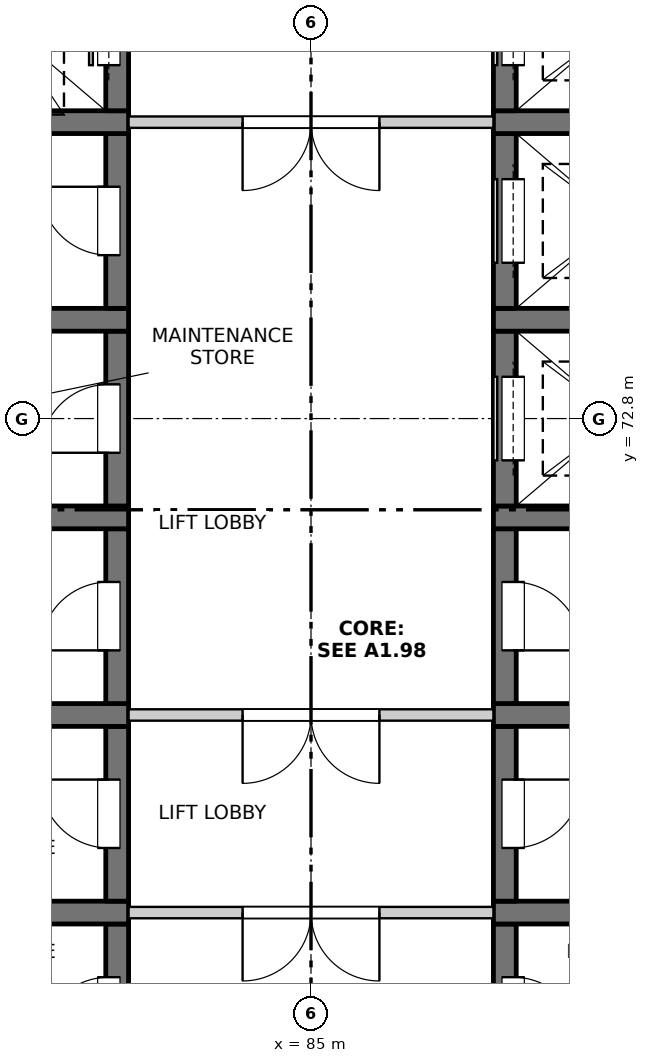
"""IFC4 building model, lengths in metres.
Left out: names, types, materials, properties, quantities, classifications, styles, units other than length and angle.
Written with IfcOpenShell. Run it as: python <this file> out.ifc"""

import sys

from ifc_helpers import new_model, si_unit, direction, frame, frame_2d, origin, place, context, subcontext, project, spatial, rectangle, extrude, element, fill, save


model = new_model("IFC4")
c1 = context("Model", 3, precision=1e-05, world=origin(), true_north=direction((0.0, 1.0)))
c2 = subcontext(c1, "Body", "Model", "MODEL_VIEW")
j1 = project(units=[si_unit("LENGTHUNIT", "METRE"), si_unit("PLANEANGLEUNIT", "RADIAN")], contexts=[c1])
p1 = place(None, origin())
s1 = spatial("IfcSite", under=j1, at=p1, CompositionType="ELEMENT")
p2 = place(p1, origin())
s2 = spatial("IfcBuilding", under=s1, at=p2, CompositionType="ELEMENT")
p3 = place(p2, frame((0.0, 0.0, 186.0)))
s3 = spatial("IfcBuildingStorey", under=s2, at=p3, CompositionType="ELEMENT", Elevation=186.0)
p4 = place(p3, frame((82.45, 63.85, -0.25), z_axis=(0.0, 0.0, 1.0), x_axis=(0.0, 1.0, 0.0)))
e1 = element("IfcWall", 1, at=p4, inside=s3, PredefinedType="SOLIDWALL", context=c2, shape_type="SweptSolid", body=[
    extrude(rectangle(XDim=2.3, YDim=0.3, at=frame_2d((1.15, 0.0))), origin(), (0.0, 0.0, 1.0), 3.4),
])
p5 = place(p4, frame((0.7, 0.0, 0.25)))
e2 = element("IfcOpeningElement", 2, at=p5, cuts=e1, PredefinedType="OPENING", context=c2, shape_type="SweptSolid", body=[
    extrude(rectangle(XDim=0.9, YDim=2.1, at=frame_2d((0.45, 1.05))), frame((0.0, 0.16, 0.0), z_axis=(0.0, -1.0, 0.0), x_axis=(1.0, 0.0, 0.0)), (0.0, 0.0, 1.0), 0.32),
])
p6 = place(p3, frame((79.6, 66.3, -0.25), z_axis=(0.0, 0.0, 1.0), x_axis=(1.0, 0.0, 0.0)))
e3 = element("IfcWall", 3, at=p6, inside=s3, PredefinedType="SOLIDWALL", context=c2, shape_type="SweptSolid", body=[
    extrude(rectangle(XDim=3.0, YDim=0.3, at=frame_2d((1.5, 0.0))), origin(), (0.0, 0.0, 1.0), 3.4),
])
p7 = place(p3, frame((82.45, 66.45, -0.25), z_axis=(0.0, 0.0, 1.0), x_axis=(0.0, 1.0, 0.0)))
e4 = element("IfcWall", 4, at=p7, inside=s3, PredefinedType="SOLIDWALL", context=c2, shape_type="SweptSolid", body=[
    extrude(rectangle(XDim=2.3, YDim=0.3, at=frame_2d((1.15, 0.0))), origin(), (0.0, 0.0, 1.0), 3.4),
])
p8 = place(p7, frame((0.7, 0.0, 0.25)))
e5 = element("IfcOpeningElement", 5, at=p8, cuts=e4, PredefinedType="OPENING", context=c2, shape_type="SweptSolid", body=[
    extrude(rectangle(XDim=0.9, YDim=2.1, at=frame_2d((0.45, 1.05))), frame((0.0, 0.16, 0.0), z_axis=(0.0, -1.0, 0.0), x_axis=(1.0, 0.0, 0.0)), (0.0, 0.0, 1.0), 0.32),
])
p9 = place(p3, frame((79.6, 68.9, -0.25), z_axis=(0.0, 0.0, 1.0), x_axis=(1.0, 0.0, 0.0)))
e6 = element("IfcWall", 6, at=p9, inside=s3, PredefinedType="SOLIDWALL", context=c2, shape_type="SweptSolid", body=[
    extrude(rectangle(XDim=3.0, YDim=0.3, at=frame_2d((1.5, 0.0))), origin(), (0.0, 0.0, 1.0), 3.4),
])
p10 = place(p3, frame((82.45, 69.05, -0.25), z_axis=(0.0, 0.0, 1.0), x_axis=(0.0, 1.0, 0.0)))
e7 = element("IfcWall", 7, at=p10, inside=s3, PredefinedType="SOLIDWALL", context=c2, shape_type="SweptSolid", body=[
    extrude(rectangle(XDim=2.3, YDim=0.3, at=frame_2d((1.15, 0.0))), origin(), (0.0, 0.0, 1.0), 3.4),
])
p11 = place(p10, frame((0.7, 0.0, 0.25)))
e8 = element("IfcOpeningElement", 8, at=p11, cuts=e7, PredefinedType="OPENING", context=c2, shape_type="SweptSolid", body=[
    extrude(rectangle(XDim=0.9, YDim=2.1, at=frame_2d((0.45, 1.05))), frame((0.0, 0.16, 0.0), z_axis=(0.0, -1.0, 0.0), x_axis=(1.0, 0.0, 0.0)), (0.0, 0.0, 1.0), 0.32),
])
p12 = place(p3, frame((79.6, 71.5, -0.25), z_axis=(0.0, 0.0, 1.0), x_axis=(1.0, 0.0, 0.0)))
e9 = element("IfcWall", 9, at=p12, inside=s3, PredefinedType="SOLIDWALL", context=c2, shape_type="SweptSolid", body=[
    extrude(rectangle(XDim=3.0, YDim=0.3, at=frame_2d((1.5, 0.0))), origin(), (0.0, 0.0, 1.0), 3.4),
])
p13 = place(p3, frame((82.45, 71.65, -0.25), z_axis=(0.0, 0.0, 1.0), x_axis=(0.0, 1.0, 0.0)))
e10 = element("IfcWall", 10, at=p13, inside=s3, PredefinedType="SOLIDWALL", context=c2, shape_type="SweptSolid", body=[
    extrude(rectangle(XDim=2.3, YDim=0.3, at=frame_2d((1.15, 0.0))), origin(), (0.0, 0.0, 1.0), 3.4),
])
p14 = place(p13, frame((0.7, 0.0, 0.25)))
e11 = element("IfcOpeningElement", 11, at=p14, cuts=e10, PredefinedType="OPENING", context=c2, shape_type="SweptSolid", body=[
    extrude(rectangle(XDim=0.9, YDim=2.1, at=frame_2d((0.45, 1.05))), frame((0.0, 0.16, 0.0), z_axis=(0.0, -1.0, 0.0), x_axis=(1.0, 0.0, 0.0)), (0.0, 0.0, 1.0), 0.32),
])
p15 = place(p3, frame((79.6, 74.1, -0.25), z_axis=(0.0, 0.0, 1.0), x_axis=(1.0, 0.0, 0.0)))
e12 = element("IfcWall", 12, at=p15, inside=s3, PredefinedType="SOLIDWALL", context=c2, shape_type="SweptSolid", body=[
    extrude(rectangle(XDim=3.0, YDim=0.3, at=frame_2d((1.5, 0.0))), origin(), (0.0, 0.0, 1.0), 3.4),
])
p16 = place(p3, frame((82.45, 74.25, -0.25), z_axis=(0.0, 0.0, 1.0), x_axis=(0.0, 1.0, 0.0)))
e13 = element("IfcWall", 13, at=p16, inside=s3, PredefinedType="SOLIDWALL", context=c2, shape_type="SweptSolid", body=[
    extrude(rectangle(XDim=2.3, YDim=0.3, at=frame_2d((1.15, 0.0))), origin(), (0.0, 0.0, 1.0), 3.4),
])
p17 = place(p16, frame((0.7, 0.0, 0.25)))
e14 = element("IfcOpeningElement", 14, at=p17, cuts=e13, PredefinedType="OPENING", context=c2, shape_type="SweptSolid", body=[
    extrude(rectangle(XDim=0.9, YDim=2.1, at=frame_2d((0.45, 1.05))), frame((0.0, 0.16, 0.0), z_axis=(0.0, -1.0, 0.0), x_axis=(1.0, 0.0, 0.0)), (0.0, 0.0, 1.0), 0.32),
])
p18 = place(p3, frame((79.6, 76.7, -0.25), z_axis=(0.0, 0.0, 1.0), x_axis=(1.0, 0.0, 0.0)))
e15 = element("IfcWall", 15, at=p18, inside=s3, PredefinedType="SOLIDWALL", context=c2, shape_type="SweptSolid", body=[
    extrude(rectangle(XDim=3.0, YDim=0.3, at=frame_2d((1.5, 0.0))), origin(), (0.0, 0.0, 1.0), 3.4),
])
p19 = place(p3, frame((82.45, 76.85, -0.25), z_axis=(0.0, 0.0, 1.0), x_axis=(0.0, 1.0, 0.0)))
e16 = element("IfcWall", 16, at=p19, inside=s3, PredefinedType="SOLIDWALL", context=c2, shape_type="SweptSolid", body=[
    extrude(rectangle(XDim=2.3, YDim=0.3, at=frame_2d((1.15, 0.0))), origin(), (0.0, 0.0, 1.0), 3.4),
])
p20 = place(p19, frame((0.6, 0.0, 0.25)))
e17 = element("IfcOpeningElement", 17, at=p20, cuts=e16, PredefinedType="OPENING", context=c2, shape_type="SweptSolid", body=[
    extrude(rectangle(XDim=1.1, YDim=2.1, at=frame_2d((0.55, 1.05))), frame((0.0, 0.16, 0.0), z_axis=(0.0, -1.0, 0.0), x_axis=(1.0, 0.0, 0.0)), (0.0, 0.0, 1.0), 0.32),
])
p21 = place(p3, frame((87.55, 63.85, -0.25), z_axis=(0.0, 0.0, 1.0), x_axis=(0.0, 1.0, 0.0)))
e18 = element("IfcWall", 18, at=p21, inside=s3, PredefinedType="SOLIDWALL", context=c2, shape_type="SweptSolid", body=[
    extrude(rectangle(XDim=2.3, YDim=0.3, at=frame_2d((1.15, 0.0))), origin(), (0.0, 0.0, 1.0), 3.4),
])
p22 = place(p21, frame((0.7, 0.0, 0.25)))
e19 = element("IfcOpeningElement", 19, at=p22, cuts=e18, PredefinedType="OPENING", context=c2, shape_type="SweptSolid", body=[
    extrude(rectangle(XDim=0.9, YDim=2.1, at=frame_2d((0.45, 1.05))), frame((0.0, 0.16, 0.0), z_axis=(0.0, -1.0, 0.0), x_axis=(1.0, 0.0, 0.0)), (0.0, 0.0, 1.0), 0.32),
])
p23 = place(p3, frame((87.4, 66.3, -0.25), z_axis=(0.0, 0.0, 1.0), x_axis=(1.0, 0.0, 0.0)))
e20 = element("IfcWall", 20, at=p23, inside=s3, PredefinedType="SOLIDWALL", context=c2, shape_type="SweptSolid", body=[
    extrude(rectangle(XDim=3.0, YDim=0.3, at=frame_2d((1.5, 0.0))), origin(), (0.0, 0.0, 1.0), 3.4),
])
p24 = place(p3, frame((87.55, 66.45, -0.25), z_axis=(0.0, 0.0, 1.0), x_axis=(0.0, 1.0, 0.0)))
e21 = element("IfcWall", 21, at=p24, inside=s3, PredefinedType="SOLIDWALL", context=c2, shape_type="SweptSolid", body=[
    extrude(rectangle(XDim=2.3, YDim=0.3, at=frame_2d((1.15, 0.0))), origin(), (0.0, 0.0, 1.0), 3.4),
])
p25 = place(p24, frame((0.7, 0.0, 0.25)))
e22 = element("IfcOpeningElement", 22, at=p25, cuts=e21, PredefinedType="OPENING", context=c2, shape_type="SweptSolid", body=[
    extrude(rectangle(XDim=0.9, YDim=2.1, at=frame_2d((0.45, 1.05))), frame((0.0, 0.16, 0.0), z_axis=(0.0, -1.0, 0.0), x_axis=(1.0, 0.0, 0.0)), (0.0, 0.0, 1.0), 0.32),
])
p26 = place(p3, frame((87.4, 68.9, -0.25), z_axis=(0.0, 0.0, 1.0), x_axis=(1.0, 0.0, 0.0)))
e23 = element("IfcWall", 23, at=p26, inside=s3, PredefinedType="SOLIDWALL", context=c2, shape_type="SweptSolid", body=[
    extrude(rectangle(XDim=3.0, YDim=0.3, at=frame_2d((1.5, 0.0))), origin(), (0.0, 0.0, 1.0), 3.4),
])
p27 = place(p3, frame((87.55, 69.05, -0.25), z_axis=(0.0, 0.0, 1.0), x_axis=(0.0, 1.0, 0.0)))
e24 = element("IfcWall", 24, at=p27, inside=s3, PredefinedType="SOLIDWALL", context=c2, shape_type="SweptSolid", body=[
    extrude(rectangle(XDim=2.3, YDim=0.3, at=frame_2d((1.15, 0.0))), origin(), (0.0, 0.0, 1.0), 3.4),
])
p28 = place(p27, frame((0.7, 0.0, 0.25)))
e25 = element("IfcOpeningElement", 25, at=p28, cuts=e24, PredefinedType="OPENING", context=c2, shape_type="SweptSolid", body=[
    extrude(rectangle(XDim=0.9, YDim=2.1, at=frame_2d((0.45, 1.05))), frame((0.0, 0.16, 0.0), z_axis=(0.0, -1.0, 0.0), x_axis=(1.0, 0.0, 0.0)), (0.0, 0.0, 1.0), 0.32),
])
p29 = place(p3, frame((87.4, 71.5, -0.25), z_axis=(0.0, 0.0, 1.0), x_axis=(1.0, 0.0, 0.0)))
e26 = element("IfcWall", 26, at=p29, inside=s3, PredefinedType="SOLIDWALL", context=c2, shape_type="SweptSolid", body=[
    extrude(rectangle(XDim=3.0, YDim=0.3, at=frame_2d((1.5, 0.0))), origin(), (0.0, 0.0, 1.0), 3.4),
])
p30 = place(p3, frame((87.55, 71.65, -0.25), z_axis=(0.0, 0.0, 1.0), x_axis=(0.0, 1.0, 0.0)))
e27 = element("IfcWall", 27, at=p30, inside=s3, PredefinedType="SOLIDWALL", context=c2, shape_type="SweptSolid", body=[
    extrude(rectangle(XDim=2.3, YDim=0.3, at=frame_2d((1.15, 0.0))), origin(), (0.0, 0.0, 1.0), 3.4),
])
p31 = place(p30, frame((0.6, 0.0, 0.25)))
e28 = element("IfcOpeningElement", 28, at=p31, cuts=e27, PredefinedType="OPENING", context=c2, shape_type="SweptSolid", body=[
    extrude(rectangle(XDim=1.1, YDim=2.1, at=frame_2d((0.55, 1.05))), frame((0.0, 0.16, 0.0), z_axis=(0.0, -1.0, 0.0), x_axis=(1.0, 0.0, 0.0)), (0.0, 0.0, 1.0), 0.32),
])
p32 = place(p3, frame((87.4, 74.1, -0.25), z_axis=(0.0, 0.0, 1.0), x_axis=(1.0, 0.0, 0.0)))
e29 = element("IfcWall", 29, at=p32, inside=s3, PredefinedType="SOLIDWALL", context=c2, shape_type="SweptSolid", body=[
    extrude(rectangle(XDim=3.0, YDim=0.3, at=frame_2d((1.5, 0.0))), origin(), (0.0, 0.0, 1.0), 3.4),
])
p33 = place(p3, frame((87.55, 74.25, -0.25), z_axis=(0.0, 0.0, 1.0), x_axis=(0.0, 1.0, 0.0)))
e30 = element("IfcWall", 30, at=p33, inside=s3, PredefinedType="SOLIDWALL", context=c2, shape_type="SweptSolid", body=[
    extrude(rectangle(XDim=2.3, YDim=0.3, at=frame_2d((1.15, 0.0))), origin(), (0.0, 0.0, 1.0), 3.4),
])
p34 = place(p33, frame((0.6, 0.0, 0.25)))
e31 = element("IfcOpeningElement", 31, at=p34, cuts=e30, PredefinedType="OPENING", context=c2, shape_type="SweptSolid", body=[
    extrude(rectangle(XDim=1.1, YDim=2.1, at=frame_2d((0.55, 1.05))), frame((0.0, 0.16, 0.0), z_axis=(0.0, -1.0, 0.0), x_axis=(1.0, 0.0, 0.0)), (0.0, 0.0, 1.0), 0.32),
])
p35 = place(p3, frame((87.4, 76.7, -0.25), z_axis=(0.0, 0.0, 1.0), x_axis=(1.0, 0.0, 0.0)))
e32 = element("IfcWall", 32, at=p35, inside=s3, PredefinedType="SOLIDWALL", context=c2, shape_type="SweptSolid", body=[
    extrude(rectangle(XDim=3.0, YDim=0.3, at=frame_2d((1.5, 0.0))), origin(), (0.0, 0.0, 1.0), 3.4),
])
p36 = place(p3, frame((87.55, 76.85, -0.25), z_axis=(0.0, 0.0, 1.0), x_axis=(0.0, 1.0, 0.0)))
e33 = element("IfcWall", 33, at=p36, inside=s3, PredefinedType="SOLIDWALL", context=c2, shape_type="SweptSolid", body=[
    extrude(rectangle(XDim=2.3, YDim=0.3, at=frame_2d((1.15, 0.0))), origin(), (0.0, 0.0, 1.0), 3.4),
])
p37 = place(p36, frame((0.6, 0.0, 0.25)))
e34 = element("IfcOpeningElement", 34, at=p37, cuts=e33, PredefinedType="OPENING", context=c2, shape_type="SweptSolid", body=[
    extrude(rectangle(XDim=1.1, YDim=2.1, at=frame_2d((0.55, 1.05))), frame((0.0, 0.16, 0.0), z_axis=(0.0, -1.0, 0.0), x_axis=(1.0, 0.0, 0.0)), (0.0, 0.0, 1.0), 0.32),
])
p38 = place(p3, frame((82.6, 66.3, 0.0), z_axis=(0.0, 0.0, 1.0), x_axis=(1.0, 0.0, 0.0)))
e35 = element("IfcWall", 35, at=p38, inside=s3, PredefinedType="PARTITIONING", context=c2, shape_type="SweptSolid", body=[
    extrude(rectangle(XDim=4.8, YDim=0.15, at=frame_2d((2.4, 0.0))), origin(), (0.0, 0.0, 1.0), 3.15),
])
p39 = place(p38, frame((1.5, 0.0, 0.0)))
e36 = element("IfcOpeningElement", 36, at=p39, cuts=e35, PredefinedType="OPENING", context=c2, shape_type="SweptSolid", body=[
    extrude(rectangle(XDim=1.8, YDim=2.1, at=frame_2d((0.9, 1.05))), frame((0.0, 0.085, 0.0), z_axis=(0.0, -1.0, 0.0), x_axis=(1.0, 0.0, 0.0)), (0.0, 0.0, 1.0), 0.17),
])
p40 = place(p3, frame((82.6, 68.9, 0.0), z_axis=(0.0, 0.0, 1.0), x_axis=(1.0, 0.0, 0.0)))
e37 = element("IfcWall", 37, at=p40, inside=s3, PredefinedType="PARTITIONING", context=c2, shape_type="SweptSolid", body=[
    extrude(rectangle(XDim=4.8, YDim=0.15, at=frame_2d((2.4, 0.0))), origin(), (0.0, 0.0, 1.0), 3.15),
])
p41 = place(p40, frame((1.5, 0.0, 0.0)))
e38 = element("IfcOpeningElement", 38, at=p41, cuts=e37, PredefinedType="OPENING", context=c2, shape_type="SweptSolid", body=[
    extrude(rectangle(XDim=1.8, YDim=2.1, at=frame_2d((0.9, 1.05))), frame((0.0, 0.085, 0.0), z_axis=(0.0, -1.0, 0.0), x_axis=(1.0, 0.0, 0.0)), (0.0, 0.0, 1.0), 0.17),
])
p42 = place(p3, frame((82.6, 76.7, 0.0), z_axis=(0.0, 0.0, 1.0), x_axis=(1.0, 0.0, 0.0)))
e39 = element("IfcWall", 39, at=p42, inside=s3, PredefinedType="PARTITIONING", context=c2, shape_type="SweptSolid", body=[
    extrude(rectangle(XDim=4.8, YDim=0.15, at=frame_2d((2.4, 0.0))), origin(), (0.0, 0.0, 1.0), 3.15),
])
p43 = place(p42, frame((1.5, 0.0, 0.0)))
e40 = element("IfcOpeningElement", 40, at=p43, cuts=e39, PredefinedType="OPENING", context=c2, shape_type="SweptSolid", body=[
    extrude(rectangle(XDim=1.8, YDim=2.1, at=frame_2d((0.9, 1.05))), frame((0.0, 0.085, 0.0), z_axis=(0.0, -1.0, 0.0), x_axis=(1.0, 0.0, 0.0)), (0.0, 0.0, 1.0), 0.17),
])
p44 = place(p5, origin())
e41 = element("IfcDoor", 41, at=p44, inside=s3, OperationType="SINGLE_SWING_LEFT", PredefinedType="DOOR", context=c2, shape_type="SweptSolid", body=[
    extrude(rectangle(XDim=0.9, YDim=2.1, at=frame_2d((0.45, 1.05))), frame((0.0, 0.135, 0.0), z_axis=(0.0, -1.0, 0.0), x_axis=(1.0, 0.0, 0.0)), (0.0, 0.0, 1.0), 0.05),
])
fill(e2, e41)
p45 = place(p22, origin())
e42 = element("IfcDoor", 42, at=p45, inside=s3, OperationType="SINGLE_SWING_RIGHT", PredefinedType="DOOR", context=c2, shape_type="SweptSolid", body=[
    extrude(rectangle(XDim=0.9, YDim=2.1, at=frame_2d((0.45, 1.05))), frame((0.0, -0.085, 0.0), z_axis=(0.0, -1.0, 0.0), x_axis=(1.0, 0.0, 0.0)), (0.0, 0.0, 1.0), 0.05),
])
fill(e19, e42)
p46 = place(p39, origin())
e43 = element("IfcDoor", 43, at=p46, inside=s3, OperationType="DOUBLE_DOOR_SINGLE_SWING", PredefinedType="DOOR", context=c2, shape_type="SweptSolid", body=[
    extrude(rectangle(XDim=1.8, YDim=2.1, at=frame_2d((0.9, 1.05))), frame((0.0, 0.025, 0.0), z_axis=(0.0, -1.0, 0.0), x_axis=(1.0, 0.0, 0.0)), (0.0, 0.0, 1.0), 0.05),
])
fill(e36, e43)
p47 = place(p8, origin())
e44 = element("IfcDoor", 44, at=p47, inside=s3, OperationType="SINGLE_SWING_RIGHT", PredefinedType="DOOR", context=c2, shape_type="SweptSolid", body=[
    extrude(rectangle(XDim=0.9, YDim=2.1, at=frame_2d((0.45, 1.05))), frame((0.0, 0.135, 0.0), z_axis=(0.0, -1.0, 0.0), x_axis=(1.0, 0.0, 0.0)), (0.0, 0.0, 1.0), 0.05),
])
fill(e5, e44)
p48 = place(p25, origin())
e45 = element("IfcDoor", 45, at=p48, inside=s3, OperationType="SINGLE_SWING_LEFT", PredefinedType="DOOR", context=c2, shape_type="SweptSolid", body=[
    extrude(rectangle(XDim=0.9, YDim=2.1, at=frame_2d((0.45, 1.05))), frame((0.0, -0.085, 0.0), z_axis=(0.0, -1.0, 0.0), x_axis=(1.0, 0.0, 0.0)), (0.0, 0.0, 1.0), 0.05),
])
fill(e22, e45)
p49 = place(p41, origin())
e46 = element("IfcDoor", 46, at=p49, inside=s3, OperationType="DOUBLE_DOOR_SINGLE_SWING", PredefinedType="DOOR", context=c2, shape_type="SweptSolid", body=[
    extrude(rectangle(XDim=1.8, YDim=2.1, at=frame_2d((0.9, 1.05))), frame((0.0, 0.025, 0.0), z_axis=(0.0, -1.0, 0.0), x_axis=(1.0, 0.0, 0.0)), (0.0, 0.0, 1.0), 0.05),
])
fill(e38, e46)
p50 = place(p11, origin())
e47 = element("IfcDoor", 47, at=p50, inside=s3, OperationType="SINGLE_SWING_LEFT", PredefinedType="DOOR", context=c2, shape_type="SweptSolid", body=[
    extrude(rectangle(XDim=0.9, YDim=2.1, at=frame_2d((0.45, 1.05))), frame((0.0, 0.135, 0.0), z_axis=(0.0, -1.0, 0.0), x_axis=(1.0, 0.0, 0.0)), (0.0, 0.0, 1.0), 0.05),
])
fill(e8, e47)
p51 = place(p28, origin())
e48 = element("IfcDoor", 48, at=p51, inside=s3, OperationType="SINGLE_SWING_RIGHT", PredefinedType="DOOR", context=c2, shape_type="SweptSolid", body=[
    extrude(rectangle(XDim=0.9, YDim=2.1, at=frame_2d((0.45, 1.05))), frame((0.0, -0.085, 0.0), z_axis=(0.0, -1.0, 0.0), x_axis=(1.0, 0.0, 0.0)), (0.0, 0.0, 1.0), 0.05),
])
fill(e25, e48)
p52 = place(p14, origin())
e49 = element("IfcDoor", 49, at=p52, inside=s3, OperationType="SINGLE_SWING_LEFT", PredefinedType="DOOR", context=c2, shape_type="SweptSolid", body=[
    extrude(rectangle(XDim=0.9, YDim=2.1, at=frame_2d((0.45, 1.05))), frame((0.0, 0.135, 0.0), z_axis=(0.0, -1.0, 0.0), x_axis=(1.0, 0.0, 0.0)), (0.0, 0.0, 1.0), 0.05),
])
fill(e11, e49)
p53 = place(p31, origin())
e50 = element("IfcDoor", 50, at=p53, inside=s3, OperationType="SLIDING_TO_LEFT", PredefinedType="DOOR", context=c2, shape_type="SweptSolid", body=[
    extrude(rectangle(XDim=1.1, YDim=2.1, at=frame_2d((0.55, 1.05))), frame((0.0, -0.085, 0.0), z_axis=(0.0, -1.0, 0.0), x_axis=(1.0, 0.0, 0.0)), (0.0, 0.0, 1.0), 0.05),
])
fill(e28, e50)
p54 = place(p17, origin())
e51 = element("IfcDoor", 51, at=p54, inside=s3, OperationType="SINGLE_SWING_RIGHT", PredefinedType="DOOR", context=c2, shape_type="SweptSolid", body=[
    extrude(rectangle(XDim=0.9, YDim=2.1, at=frame_2d((0.45, 1.05))), frame((0.0, 0.135, 0.0), z_axis=(0.0, -1.0, 0.0), x_axis=(1.0, 0.0, 0.0)), (0.0, 0.0, 1.0), 0.05),
])
fill(e14, e51)
p55 = place(p34, origin())
e52 = element("IfcDoor", 52, at=p55, inside=s3, OperationType="SLIDING_TO_LEFT", PredefinedType="DOOR", context=c2, shape_type="SweptSolid", body=[
    extrude(rectangle(XDim=1.1, YDim=2.1, at=frame_2d((0.55, 1.05))), frame((0.0, -0.085, 0.0), z_axis=(0.0, -1.0, 0.0), x_axis=(1.0, 0.0, 0.0)), (0.0, 0.0, 1.0), 0.05),
])
fill(e31, e52)
p56 = place(p43, origin())
e53 = element("IfcDoor", 53, at=p56, inside=s3, OperationType="DOUBLE_DOOR_SINGLE_SWING", PredefinedType="DOOR", context=c2, shape_type="SweptSolid", body=[
    extrude(rectangle(XDim=1.8, YDim=2.1, at=frame_2d((0.9, 1.05))), frame((0.0, 0.025, 0.0), z_axis=(0.0, -1.0, 0.0), x_axis=(1.0, 0.0, 0.0)), (0.0, 0.0, 1.0), 0.05),
])
fill(e40, e53)
p57 = place(p20, origin())
e54 = element("IfcDoor", 54, at=p57, inside=s3, OperationType="SLIDING_TO_LEFT", PredefinedType="DOOR", context=c2, shape_type="SweptSolid", body=[
    extrude(rectangle(XDim=1.1, YDim=2.1, at=frame_2d((0.55, 1.05))), frame((0.0, 0.135, 0.0), z_axis=(0.0, -1.0, 0.0), x_axis=(1.0, 0.0, 0.0)), (0.0, 0.0, 1.0), 0.05),
])
fill(e17, e54)
p58 = place(p37, origin())
e55 = element("IfcDoor", 55, at=p58, inside=s3, OperationType="SLIDING_TO_LEFT", PredefinedType="DOOR", context=c2, shape_type="SweptSolid", body=[
    extrude(rectangle(XDim=1.1, YDim=2.1, at=frame_2d((0.55, 1.05))), frame((0.0, -0.085, 0.0), z_axis=(0.0, -1.0, 0.0), x_axis=(1.0, 0.0, 0.0)), (0.0, 0.0, 1.0), 0.05),
])
fill(e34, e55)
save(model, sys.argv[1])
